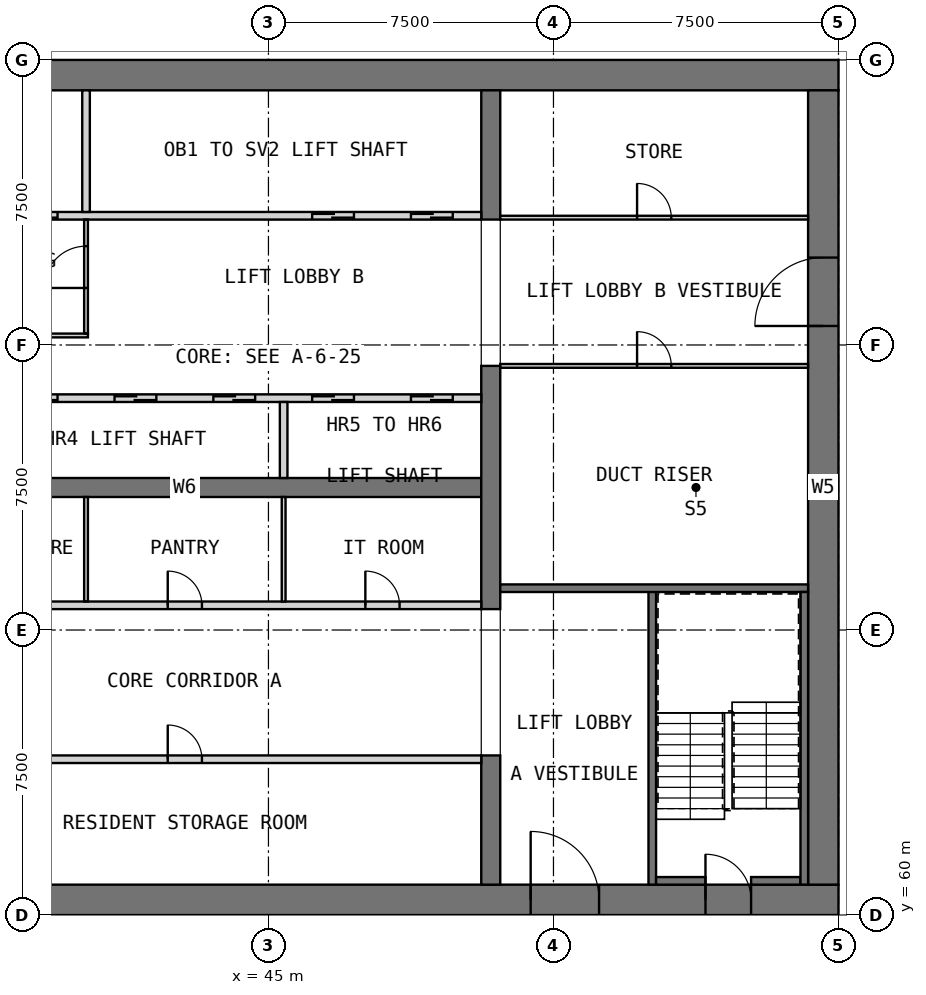
"""IFC4 building model, lengths in metres.
Left out: names, types, materials, properties, quantities, classifications, styles, units other than length and angle.
Written with IfcOpenShell. Run it as: python <this file> out.ifc"""

import sys

from ifc_helpers import new_model, si_unit, direction, frame, frame_2d, origin, place, context, subcontext, project, spatial, rectangle, extrude, element, fill, save


model = new_model("IFC4")
c1 = context("Model", 3, precision=1e-05, world=origin(), true_north=direction((0.0, 1.0)))
c2 = subcontext(c1, "Body", "Model", "MODEL_VIEW")
j1 = project(units=[si_unit("LENGTHUNIT", "METRE"), si_unit("PLANEANGLEUNIT", "RADIAN")], contexts=[c1])
p1 = place(None, origin())
s1 = spatial("IfcSite", under=j1, at=p1, CompositionType="ELEMENT")
p2 = place(p1, origin())
s2 = spatial("IfcBuilding", under=s1, at=p2, CompositionType="ELEMENT")
p3 = place(p2, frame((0.0, 0.0, 182.7)))
s3 = spatial("IfcBuildingStorey", under=s2, at=p3, CompositionType="ELEMENT", Elevation=182.7)
p4 = place(p3, frame((30.0, 60.4, 0.0), z_axis=(0.0, 0.0, 1.0), x_axis=(1.0, 0.0, 0.0)))
e1 = element("IfcWall", 1, at=p4, inside=s3, PredefinedType="SHEAR", context=c2, shape_type="SweptSolid", body=[
    extrude(rectangle(XDim=30.0, YDim=0.8, at=frame_2d((15.0, 0.0))), origin(), (0.0, 0.0, 1.0), 3.5),
])
p5 = place(p4, frame((21.9, 0.0, 0.0)))
e2 = element("IfcOpeningElement", 2, at=p5, cuts=e1, PredefinedType="OPENING", context=c2, shape_type="SweptSolid", body=[
    extrude(rectangle(XDim=1.8, YDim=2.1, at=frame_2d((0.9, 1.05))), frame((0.0, 0.41, 0.0), z_axis=(0.0, -1.0, 0.0), x_axis=(1.0, 0.0, 0.0)), (0.0, 0.0, 1.0), 0.82),
])
p6 = place(p4, frame((26.5, 0.0, 0.0)))
e3 = element("IfcOpeningElement", 3, at=p6, cuts=e1, PredefinedType="OPENING", context=c2, shape_type="SweptSolid", body=[
    extrude(rectangle(XDim=1.2, YDim=2.1, at=frame_2d((0.6, 1.05))), frame((0.0, 0.41, 0.0), z_axis=(0.0, -1.0, 0.0), x_axis=(1.0, 0.0, 0.0)), (0.0, 0.0, 1.0), 0.82),
])
p7 = place(p3, frame((30.0, 82.1, 0.0), z_axis=(0.0, 0.0, 1.0), x_axis=(1.0, 0.0, 0.0)))
e4 = element("IfcWall", 4, at=p7, inside=s3, PredefinedType="SHEAR", context=c2, shape_type="SweptSolid", body=[
    extrude(rectangle(XDim=30.0, YDim=0.8, at=frame_2d((15.0, 0.0))), origin(), (0.0, 0.0, 1.0), 3.5),
])
p8 = place(p3, frame((59.6, 60.8, 0.0), z_axis=(0.0, 0.0, 1.0), x_axis=(0.0, 1.0, 0.0)))
e5 = element("IfcWall", 5, at=p8, inside=s3, PredefinedType="SHEAR", context=c2, shape_type="SweptSolid", body=[
    extrude(rectangle(XDim=20.9, YDim=0.8, at=frame_2d((10.45, 0.0))), origin(), (0.0, 0.0, 1.0), 3.5),
])
p9 = place(p8, frame((14.7, 0.0, 0.0)))
e6 = element("IfcOpeningElement", 6, at=p9, cuts=e5, PredefinedType="OPENING", context=c2, shape_type="SweptSolid", body=[
    extrude(rectangle(XDim=1.8, YDim=2.1, at=frame_2d((0.9, 1.05))), frame((0.0, 0.41, 0.0), z_axis=(0.0, -1.0, 0.0), x_axis=(1.0, 0.0, 0.0)), (0.0, 0.0, 1.0), 0.82),
])
p10 = place(p3, frame((35.0, 71.25, 0.0), z_axis=(0.0, 0.0, 1.0), x_axis=(1.0, 0.0, 0.0)))
e7 = element("IfcWall", 7, at=p10, inside=s3, PredefinedType="SHEAR", context=c2, shape_type="SweptSolid", body=[
    extrude(rectangle(XDim=15.6, YDim=0.5, at=frame_2d((7.8, 0.0))), origin(), (0.0, 0.0, 1.0), 3.5),
])
p11 = place(p3, frame((50.85, 60.8, 0.0), z_axis=(0.0, 0.0, 1.0), x_axis=(0.0, 1.0, 0.0)))
e8 = element("IfcWall", 8, at=p11, inside=s3, PredefinedType="SHEAR", context=c2, shape_type="SweptSolid", body=[
    extrude(rectangle(XDim=3.4, YDim=0.5, at=frame_2d((1.7, 0.0))), origin(), (0.0, 0.0, 1.0), 3.5),
])
p12 = place(p3, frame((50.85, 68.05, 0.0), z_axis=(0.0, 0.0, 1.0), x_axis=(0.0, 1.0, 0.0)))
e9 = element("IfcWall", 9, at=p12, inside=s3, PredefinedType="SHEAR", context=c2, shape_type="SweptSolid", body=[
    extrude(rectangle(XDim=6.4, YDim=0.5, at=frame_2d((3.2, 0.0))), origin(), (0.0, 0.0, 1.0), 3.5),
])
p13 = place(p3, frame((50.85, 78.3, 0.0), z_axis=(0.0, 0.0, 1.0), x_axis=(0.0, 1.0, 0.0)))
e10 = element("IfcWall", 10, at=p13, inside=s3, PredefinedType="SHEAR", context=c2, shape_type="SweptSolid", body=[
    extrude(rectangle(XDim=3.4, YDim=0.5, at=frame_2d((1.7, 0.0))), origin(), (0.0, 0.0, 1.0), 3.5),
])
p14 = place(p3, frame((35.0, 64.1, 0.0), z_axis=(0.0, 0.0, 1.0), x_axis=(1.0, 0.0, 0.0)))
e11 = element("IfcWall", 11, at=p14, inside=s3, PredefinedType="PARTITIONING", context=c2, shape_type="SweptSolid", body=[
    extrude(rectangle(XDim=15.6, YDim=0.2, at=frame_2d((7.8, 0.0))), origin(), (0.0, 0.0, 1.0), 3.25),
])
p15 = place(p14, frame((7.35, 0.0, 0.0)))
e12 = element("IfcOpeningElement", 12, at=p15, cuts=e11, PredefinedType="OPENING", context=c2, shape_type="SweptSolid", body=[
    extrude(rectangle(XDim=0.9, YDim=2.1, at=frame_2d((0.45, 1.05))), frame((0.0, 0.11, 0.0), z_axis=(0.0, -1.0, 0.0), x_axis=(1.0, 0.0, 0.0)), (0.0, 0.0, 1.0), 0.22),
])
p16 = place(p3, frame((35.0, 68.15, 0.0), z_axis=(0.0, 0.0, 1.0), x_axis=(1.0, 0.0, 0.0)))
e13 = element("IfcWall", 13, at=p16, inside=s3, PredefinedType="PARTITIONING", context=c2, shape_type="SweptSolid", body=[
    extrude(rectangle(XDim=15.6, YDim=0.2, at=frame_2d((7.8, 0.0))), origin(), (0.0, 0.0, 1.0), 3.25),
])
p17 = place(p16, frame((2.15, 0.0, 0.0)))
e14 = element("IfcOpeningElement", 14, at=p17, cuts=e13, PredefinedType="OPENING", context=c2, shape_type="SweptSolid", body=[
    extrude(rectangle(XDim=0.9, YDim=2.1, at=frame_2d((0.45, 1.05))), frame((0.0, 0.11, 0.0), z_axis=(0.0, -1.0, 0.0), x_axis=(1.0, 0.0, 0.0)), (0.0, 0.0, 1.0), 0.22),
])
p18 = place(p16, frame((7.35, 0.0, 0.0)))
e15 = element("IfcOpeningElement", 15, at=p18, cuts=e13, PredefinedType="OPENING", context=c2, shape_type="SweptSolid", body=[
    extrude(rectangle(XDim=0.9, YDim=2.1, at=frame_2d((0.45, 1.05))), frame((0.0, 0.11, 0.0), z_axis=(0.0, -1.0, 0.0), x_axis=(1.0, 0.0, 0.0)), (0.0, 0.0, 1.0), 0.22),
])
p19 = place(p16, frame((12.55, 0.0, 0.0)))
e16 = element("IfcOpeningElement", 16, at=p19, cuts=e13, PredefinedType="OPENING", context=c2, shape_type="SweptSolid", body=[
    extrude(rectangle(XDim=0.9, YDim=2.1, at=frame_2d((0.45, 1.05))), frame((0.0, 0.11, 0.0), z_axis=(0.0, -1.0, 0.0), x_axis=(1.0, 0.0, 0.0)), (0.0, 0.0, 1.0), 0.22),
])
for number, where, z_axis, x_axis in (
    (17, (40.2, 68.25, 0.0), (0.0, 0.0, 1.0), (0.0, 1.0, 0.0)),
    (18, (45.4, 68.25, 0.0), (0.0, 0.0, 1.0), (0.0, 1.0, 0.0)),
):
    element("IfcWall", number, at=place(p3, frame(where, z_axis=z_axis, x_axis=x_axis)), inside=s3, PredefinedType="PARTITIONING", context=c2, shape_type="SweptSolid", body=[
        extrude(rectangle(XDim=2.75, YDim=0.1, at=frame_2d((1.375, 0.0))), origin(), (0.0, 0.0, 1.0), 3.25),
    ])
p20 = place(p3, frame((35.0, 73.6, 0.0), z_axis=(0.0, 0.0, 1.0), x_axis=(1.0, 0.0, 0.0)))
e19 = element("IfcWall", 19, at=p20, inside=s3, PredefinedType="SOLIDWALL", context=c2, shape_type="SweptSolid", body=[
    extrude(rectangle(XDim=15.6, YDim=0.2, at=frame_2d((7.8, 0.0))), origin(), (0.0, 0.0, 1.0), 3.5),
])
p21 = place(p20, frame((0.75, 0.0, 0.0)))
e20 = element("IfcOpeningElement", 20, at=p21, cuts=e19, PredefinedType="OPENING", context=c2, shape_type="SweptSolid", body=[
    extrude(rectangle(XDim=1.1, YDim=2.1, at=frame_2d((0.55, 1.05))), frame((0.0, 0.11, 0.0), z_axis=(0.0, -1.0, 0.0), x_axis=(1.0, 0.0, 0.0)), (0.0, 0.0, 1.0), 0.22),
])
p22 = place(p20, frame((3.35, 0.0, 0.0)))
e21 = element("IfcOpeningElement", 21, at=p22, cuts=e19, PredefinedType="OPENING", context=c2, shape_type="SweptSolid", body=[
    extrude(rectangle(XDim=1.1, YDim=2.1, at=frame_2d((0.55, 1.05))), frame((0.0, 0.11, 0.0), z_axis=(0.0, -1.0, 0.0), x_axis=(1.0, 0.0, 0.0)), (0.0, 0.0, 1.0), 0.22),
])
p23 = place(p20, frame((5.95, 0.0, 0.0)))
e22 = element("IfcOpeningElement", 22, at=p23, cuts=e19, PredefinedType="OPENING", context=c2, shape_type="SweptSolid", body=[
    extrude(rectangle(XDim=1.1, YDim=2.1, at=frame_2d((0.55, 1.05))), frame((0.0, 0.11, 0.0), z_axis=(0.0, -1.0, 0.0), x_axis=(1.0, 0.0, 0.0)), (0.0, 0.0, 1.0), 0.22),
])
p24 = place(p20, frame((8.55, 0.0, 0.0)))
e23 = element("IfcOpeningElement", 23, at=p24, cuts=e19, PredefinedType="OPENING", context=c2, shape_type="SweptSolid", body=[
    extrude(rectangle(XDim=1.1, YDim=2.1, at=frame_2d((0.55, 1.05))), frame((0.0, 0.11, 0.0), z_axis=(0.0, -1.0, 0.0), x_axis=(1.0, 0.0, 0.0)), (0.0, 0.0, 1.0), 0.22),
])
p25 = place(p20, frame((11.15, 0.0, 0.0)))
e24 = element("IfcOpeningElement", 24, at=p25, cuts=e19, PredefinedType="OPENING", context=c2, shape_type="SweptSolid", body=[
    extrude(rectangle(XDim=1.1, YDim=2.1, at=frame_2d((0.55, 1.05))), frame((0.0, 0.11, 0.0), z_axis=(0.0, -1.0, 0.0), x_axis=(1.0, 0.0, 0.0)), (0.0, 0.0, 1.0), 0.22),
])
p26 = place(p20, frame((13.75, 0.0, 0.0)))
e25 = element("IfcOpeningElement", 25, at=p26, cuts=e19, PredefinedType="OPENING", context=c2, shape_type="SweptSolid", body=[
    extrude(rectangle(XDim=1.1, YDim=2.1, at=frame_2d((0.55, 1.05))), frame((0.0, 0.11, 0.0), z_axis=(0.0, -1.0, 0.0), x_axis=(1.0, 0.0, 0.0)), (0.0, 0.0, 1.0), 0.22),
])
p27 = place(p3, frame((45.4, 71.5, 0.0), z_axis=(0.0, 0.0, 1.0), x_axis=(0.0, 1.0, 0.0)))
e26 = element("IfcWall", 26, at=p27, inside=s3, PredefinedType="SOLIDWALL", context=c2, shape_type="SweptSolid", body=[
    extrude(rectangle(XDim=2.0, YDim=0.2, at=frame_2d((1.0, 0.0))), origin(), (0.0, 0.0, 1.0), 3.5),
])
p28 = place(p3, frame((35.0, 78.4, 0.0), z_axis=(0.0, 0.0, 1.0), x_axis=(1.0, 0.0, 0.0)))
e27 = element("IfcWall", 27, at=p28, inside=s3, PredefinedType="SOLIDWALL", context=c2, shape_type="SweptSolid", body=[
    extrude(rectangle(XDim=15.6, YDim=0.2, at=frame_2d((7.8, 0.0))), origin(), (0.0, 0.0, 1.0), 3.5),
])
p29 = place(p28, frame((0.75, 0.0, 0.0)))
e28 = element("IfcOpeningElement", 28, at=p29, cuts=e27, PredefinedType="OPENING", context=c2, shape_type="SweptSolid", body=[
    extrude(rectangle(XDim=1.1, YDim=2.1, at=frame_2d((0.55, 1.05))), frame((0.0, 0.11, 0.0), z_axis=(0.0, -1.0, 0.0), x_axis=(1.0, 0.0, 0.0)), (0.0, 0.0, 1.0), 0.22),
])
p30 = place(p28, frame((3.35, 0.0, 0.0)))
e29 = element("IfcOpeningElement", 29, at=p30, cuts=e27, PredefinedType="OPENING", context=c2, shape_type="SweptSolid", body=[
    extrude(rectangle(XDim=1.1, YDim=2.1, at=frame_2d((0.55, 1.05))), frame((0.0, 0.11, 0.0), z_axis=(0.0, -1.0, 0.0), x_axis=(1.0, 0.0, 0.0)), (0.0, 0.0, 1.0), 0.22),
])
p31 = place(p28, frame((11.15, 0.0, 0.0)))
e30 = element("IfcOpeningElement", 30, at=p31, cuts=e27, PredefinedType="OPENING", context=c2, shape_type="SweptSolid", body=[
    extrude(rectangle(XDim=1.1, YDim=2.1, at=frame_2d((0.55, 1.05))), frame((0.0, 0.11, 0.0), z_axis=(0.0, -1.0, 0.0), x_axis=(1.0, 0.0, 0.0)), (0.0, 0.0, 1.0), 0.22),
])
p32 = place(p28, frame((13.75, 0.0, 0.0)))
e31 = element("IfcOpeningElement", 31, at=p32, cuts=e27, PredefinedType="OPENING", context=c2, shape_type="SweptSolid", body=[
    extrude(rectangle(XDim=1.1, YDim=2.1, at=frame_2d((0.55, 1.05))), frame((0.0, 0.11, 0.0), z_axis=(0.0, -1.0, 0.0), x_axis=(1.0, 0.0, 0.0)), (0.0, 0.0, 1.0), 0.22),
])
p33 = place(p3, frame((40.2, 78.5, 0.0), z_axis=(0.0, 0.0, 1.0), x_axis=(0.0, 1.0, 0.0)))
e32 = element("IfcWall", 32, at=p33, inside=s3, PredefinedType="SOLIDWALL", context=c2, shape_type="SweptSolid", body=[
    extrude(rectangle(XDim=3.2, YDim=0.2, at=frame_2d((1.6, 0.0))), origin(), (0.0, 0.0, 1.0), 3.5),
])
p34 = place(p3, frame((35.0, 75.25, 0.0), z_axis=(0.0, 0.0, 1.0), x_axis=(1.0, 0.0, 0.0)))
e33 = element("IfcWall", 33, at=p34, inside=s3, PredefinedType="PARTITIONING", context=c2, shape_type="SweptSolid", body=[
    extrude(rectangle(XDim=5.25, YDim=0.1, at=frame_2d((2.625, 0.0))), origin(), (0.0, 0.0, 1.0), 3.25),
])
p35 = place(p3, frame((40.2, 75.3, 0.0), z_axis=(0.0, 0.0, 1.0), x_axis=(0.0, 1.0, 0.0)))
e34 = element("IfcWall", 34, at=p35, inside=s3, PredefinedType="PARTITIONING", context=c2, shape_type="SweptSolid", body=[
    extrude(rectangle(XDim=3.0, YDim=0.1, at=frame_2d((1.5, 0.0))), origin(), (0.0, 0.0, 1.0), 3.25),
])
p36 = place(p35, frame((1.2, 0.0, 0.0)))
e35 = element("IfcOpeningElement", 35, at=p36, cuts=e34, PredefinedType="OPENING", context=c2, shape_type="SweptSolid", body=[
    extrude(rectangle(XDim=1.1, YDim=2.1, at=frame_2d((0.55, 1.05))), frame((0.0, 0.06, 0.0), z_axis=(0.0, -1.0, 0.0), x_axis=(1.0, 0.0, 0.0)), (0.0, 0.0, 1.0), 0.12),
])
p37 = place(p3, frame((55.1, 60.8, 0.0), z_axis=(0.0, 0.0, 1.0), x_axis=(0.0, 1.0, 0.0)))
e36 = element("IfcWall", 36, at=p37, inside=s3, PredefinedType="SOLIDWALL", context=c2, shape_type="SweptSolid", body=[
    extrude(rectangle(XDim=7.8, YDim=0.2, at=frame_2d((3.9, 0.0))), origin(), (0.0, 0.0, 1.0), 3.25),
])
p38 = place(p3, frame((51.1, 68.6, 0.0), z_axis=(0.0, 0.0, 1.0), x_axis=(1.0, 0.0, 0.0)))
e37 = element("IfcWall", 37, at=p38, inside=s3, PredefinedType="SOLIDWALL", context=c2, shape_type="SweptSolid", body=[
    extrude(rectangle(XDim=8.1, YDim=0.2, at=frame_2d((4.05, 0.0))), origin(), (0.0, 0.0, 1.0), 3.25),
])
for number, where, z_axis, x_axis in (
    (38, (55.2, 60.9, 0.0), (0.0, 0.0, 1.0), (1.0, 0.0, 0.0)),
    (39, (57.7, 60.9, 0.0), (0.0, 0.0, 1.0), (1.0, 0.0, 0.0)),
):
    element("IfcWall", number, at=place(p3, frame(where, z_axis=z_axis, x_axis=x_axis)), inside=s3, PredefinedType="SOLIDWALL", context=c2, shape_type="SweptSolid", body=[
        extrude(rectangle(XDim=1.3, YDim=0.2, at=frame_2d((0.65, 0.0))), origin(), (0.0, 0.0, 1.0), 3.25),
    ])
p39 = place(p3, frame((59.1, 60.8, 0.0), z_axis=(0.0, 0.0, 1.0), x_axis=(0.0, 1.0, 0.0)))
e40 = element("IfcWall", 40, at=p39, inside=s3, PredefinedType="SOLIDWALL", context=c2, shape_type="SweptSolid", body=[
    extrude(rectangle(XDim=7.7, YDim=0.2, at=frame_2d((3.85, 0.0))), origin(), (0.0, 0.0, 1.0), 3.25),
])
p40 = place(p3, frame((51.1, 74.45, 0.0), z_axis=(0.0, 0.0, 1.0), x_axis=(1.0, 0.0, 0.0)))
e41 = element("IfcWall", 41, at=p40, inside=s3, PredefinedType="PARTITIONING", context=c2, shape_type="SweptSolid", body=[
    extrude(rectangle(XDim=8.1, YDim=0.1, at=frame_2d((4.05, 0.0))), origin(), (0.0, 0.0, 1.0), 3.25),
])
p41 = place(p40, frame((3.6, 0.0, 0.0)))
e42 = element("IfcOpeningElement", 42, at=p41, cuts=e41, PredefinedType="OPENING", context=c2, shape_type="SweptSolid", body=[
    extrude(rectangle(XDim=0.9, YDim=2.1, at=frame_2d((0.45, 1.05))), frame((0.0, 0.06, 0.0), z_axis=(0.0, -1.0, 0.0), x_axis=(1.0, 0.0, 0.0)), (0.0, 0.0, 1.0), 0.12),
])
p42 = place(p3, frame((51.1, 78.35, 0.0), z_axis=(0.0, 0.0, 1.0), x_axis=(1.0, 0.0, 0.0)))
e43 = element("IfcWall", 43, at=p42, inside=s3, PredefinedType="PARTITIONING", context=c2, shape_type="SweptSolid", body=[
    extrude(rectangle(XDim=8.1, YDim=0.1, at=frame_2d((4.05, 0.0))), origin(), (0.0, 0.0, 1.0), 3.25),
])
p43 = place(p42, frame((3.6, 0.0, 0.0)))
e44 = element("IfcOpeningElement", 44, at=p43, cuts=e43, PredefinedType="OPENING", context=c2, shape_type="SweptSolid", body=[
    extrude(rectangle(XDim=0.9, YDim=2.1, at=frame_2d((0.45, 1.05))), frame((0.0, 0.06, 0.0), z_axis=(0.0, -1.0, 0.0), x_axis=(1.0, 0.0, 0.0)), (0.0, 0.0, 1.0), 0.12),
])
p44 = place(p15, origin())
e45 = element("IfcDoor", 45, at=p44, inside=s3, OperationType="SINGLE_SWING_RIGHT", PredefinedType="DOOR", context=c2, shape_type="SweptSolid", body=[
    extrude(rectangle(XDim=0.9, YDim=2.1, at=frame_2d((0.45, 1.05))), frame((0.0, 0.025, 0.0), z_axis=(0.0, -1.0, 0.0), x_axis=(1.0, 0.0, 0.0)), (0.0, 0.0, 1.0), 0.05),
])
fill(e12, e45)
p45 = place(p18, origin())
e46 = element("IfcDoor", 46, at=p45, inside=s3, OperationType="SINGLE_SWING_LEFT", PredefinedType="DOOR", context=c2, shape_type="SweptSolid", body=[
    extrude(rectangle(XDim=0.9, YDim=2.1, at=frame_2d((0.45, 1.05))), frame((0.0, 0.025, 0.0), z_axis=(0.0, -1.0, 0.0), x_axis=(1.0, 0.0, 0.0)), (0.0, 0.0, 1.0), 0.05),
])
fill(e15, e46)
p46 = place(p19, origin())
e47 = element("IfcDoor", 47, at=p46, inside=s3, OperationType="SINGLE_SWING_RIGHT", PredefinedType="DOOR", context=c2, shape_type="SweptSolid", body=[
    extrude(rectangle(XDim=0.9, YDim=2.1, at=frame_2d((0.45, 1.05))), frame((0.0, 0.025, 0.0), z_axis=(0.0, -1.0, 0.0), x_axis=(1.0, 0.0, 0.0)), (0.0, 0.0, 1.0), 0.05),
])
fill(e16, e47)
p47 = place(p22, origin())
e48 = element("IfcDoor", 48, at=p47, inside=s3, OperationType="DOUBLE_DOOR_SLIDING", PredefinedType="DOOR", context=c2, shape_type="SweptSolid", body=[
    extrude(rectangle(XDim=1.1, YDim=2.1, at=frame_2d((0.55, 1.05))), frame((0.0, 0.025, 0.0), z_axis=(0.0, -1.0, 0.0), x_axis=(1.0, 0.0, 0.0)), (0.0, 0.0, 1.0), 0.05),
])
fill(e21, e48)
p48 = place(p23, origin())
e49 = element("IfcDoor", 49, at=p48, inside=s3, OperationType="DOUBLE_DOOR_SLIDING", PredefinedType="DOOR", context=c2, shape_type="SweptSolid", body=[
    extrude(rectangle(XDim=1.1, YDim=2.1, at=frame_2d((0.55, 1.05))), frame((0.0, 0.025, 0.0), z_axis=(0.0, -1.0, 0.0), x_axis=(1.0, 0.0, 0.0)), (0.0, 0.0, 1.0), 0.05),
])
fill(e22, e49)
p49 = place(p24, origin())
e50 = element("IfcDoor", 50, at=p49, inside=s3, OperationType="DOUBLE_DOOR_SLIDING", PredefinedType="DOOR", context=c2, shape_type="SweptSolid", body=[
    extrude(rectangle(XDim=1.1, YDim=2.1, at=frame_2d((0.55, 1.05))), frame((0.0, 0.025, 0.0), z_axis=(0.0, -1.0, 0.0), x_axis=(1.0, 0.0, 0.0)), (0.0, 0.0, 1.0), 0.05),
])
fill(e23, e50)
p50 = place(p25, origin())
e51 = element("IfcDoor", 51, at=p50, inside=s3, OperationType="DOUBLE_DOOR_SLIDING", PredefinedType="DOOR", context=c2, shape_type="SweptSolid", body=[
    extrude(rectangle(XDim=1.1, YDim=2.1, at=frame_2d((0.55, 1.05))), frame((0.0, 0.025, 0.0), z_axis=(0.0, -1.0, 0.0), x_axis=(1.0, 0.0, 0.0)), (0.0, 0.0, 1.0), 0.05),
])
fill(e24, e51)
p51 = place(p26, origin())
e52 = element("IfcDoor", 52, at=p51, inside=s3, OperationType="DOUBLE_DOOR_SLIDING", PredefinedType="DOOR", context=c2, shape_type="SweptSolid", body=[
    extrude(rectangle(XDim=1.1, YDim=2.1, at=frame_2d((0.55, 1.05))), frame((0.0, 0.025, 0.0), z_axis=(0.0, -1.0, 0.0), x_axis=(1.0, 0.0, 0.0)), (0.0, 0.0, 1.0), 0.05),
])
fill(e25, e52)
p52 = place(p30, origin())
e53 = element("IfcDoor", 53, at=p52, inside=s3, OperationType="DOUBLE_DOOR_SLIDING", PredefinedType="DOOR", context=c2, shape_type="SweptSolid", body=[
    extrude(rectangle(XDim=1.1, YDim=2.1, at=frame_2d((0.55, 1.05))), frame((0.0, 0.025, 0.0), z_axis=(0.0, -1.0, 0.0), x_axis=(1.0, 0.0, 0.0)), (0.0, 0.0, 1.0), 0.05),
])
fill(e29, e53)
p53 = place(p31, origin())
e54 = element("IfcDoor", 54, at=p53, inside=s3, OperationType="DOUBLE_DOOR_SLIDING", PredefinedType="DOOR", context=c2, shape_type="SweptSolid", body=[
    extrude(rectangle(XDim=1.1, YDim=2.1, at=frame_2d((0.55, 1.05))), frame((0.0, 0.025, 0.0), z_axis=(0.0, -1.0, 0.0), x_axis=(1.0, 0.0, 0.0)), (0.0, 0.0, 1.0), 0.05),
])
fill(e30, e54)
p54 = place(p32, origin())
e55 = element("IfcDoor", 55, at=p54, inside=s3, OperationType="DOUBLE_DOOR_SLIDING", PredefinedType="DOOR", context=c2, shape_type="SweptSolid", body=[
    extrude(rectangle(XDim=1.1, YDim=2.1, at=frame_2d((0.55, 1.05))), frame((0.0, 0.025, 0.0), z_axis=(0.0, -1.0, 0.0), x_axis=(1.0, 0.0, 0.0)), (0.0, 0.0, 1.0), 0.05),
])
fill(e31, e55)
p55 = place(p5, origin())
e56 = element("IfcDoor", 56, at=p55, inside=s3, OperationType="DOUBLE_DOOR_SINGLE_SWING", PredefinedType="DOOR", context=c2, shape_type="SweptSolid", body=[
    extrude(rectangle(XDim=1.8, YDim=2.1, at=frame_2d((0.9, 1.05))), frame((0.0, 0.025, 0.0), z_axis=(0.0, -1.0, 0.0), x_axis=(1.0, 0.0, 0.0)), (0.0, 0.0, 1.0), 0.05),
])
fill(e2, e56)
p56 = place(p9, origin())
e57 = element("IfcDoor", 57, at=p56, inside=s3, OperationType="DOUBLE_DOOR_SINGLE_SWING", PredefinedType="DOOR", context=c2, shape_type="SweptSolid", body=[
    extrude(rectangle(XDim=1.8, YDim=2.1, at=frame_2d((0.9, 1.05))), frame((0.0, 0.025, 0.0), z_axis=(0.0, -1.0, 0.0), x_axis=(1.0, 0.0, 0.0)), (0.0, 0.0, 1.0), 0.05),
])
fill(e6, e57)
p57 = place(p36, origin())
e58 = element("IfcDoor", 58, at=p57, inside=s3, OperationType="SINGLE_SWING_LEFT", PredefinedType="DOOR", context=c2, shape_type="SweptSolid", body=[
    extrude(rectangle(XDim=1.1, YDim=2.1, at=frame_2d((0.55, 1.05))), frame((0.0, 0.025, 0.0), z_axis=(0.0, -1.0, 0.0), x_axis=(1.0, 0.0, 0.0)), (0.0, 0.0, 1.0), 0.05),
])
fill(e35, e58)
p58 = place(p6, origin())
e59 = element("IfcDoor", 59, at=p58, inside=s3, OperationType="SINGLE_SWING_LEFT", PredefinedType="DOOR", context=c2, shape_type="SweptSolid", body=[
    extrude(rectangle(XDim=1.2, YDim=2.1, at=frame_2d((0.6, 1.05))), frame((0.0, 0.025, 0.0), z_axis=(0.0, -1.0, 0.0), x_axis=(1.0, 0.0, 0.0)), (0.0, 0.0, 1.0), 0.05),
])
fill(e3, e59)
p59 = place(p41, origin())
e60 = element("IfcDoor", 60, at=p59, inside=s3, OperationType="SINGLE_SWING_RIGHT", PredefinedType="DOOR", context=c2, shape_type="SweptSolid", body=[
    extrude(rectangle(XDim=0.9, YDim=2.1, at=frame_2d((0.45, 1.05))), frame((0.0, 0.025, 0.0), z_axis=(0.0, -1.0, 0.0), x_axis=(1.0, 0.0, 0.0)), (0.0, 0.0, 1.0), 0.05),
])
fill(e42, e60)
p60 = place(p43, origin())
e61 = element("IfcDoor", 61, at=p60, inside=s3, OperationType="SINGLE_SWING_RIGHT", PredefinedType="DOOR", context=c2, shape_type="SweptSolid", body=[
    extrude(rectangle(XDim=0.9, YDim=2.1, at=frame_2d((0.45, 1.05))), frame((0.0, 0.025, 0.0), z_axis=(0.0, -1.0, 0.0), x_axis=(1.0, 0.0, 0.0)), (0.0, 0.0, 1.0), 0.05),
])
fill(e44, e61)
save(model, sys.argv[1])
